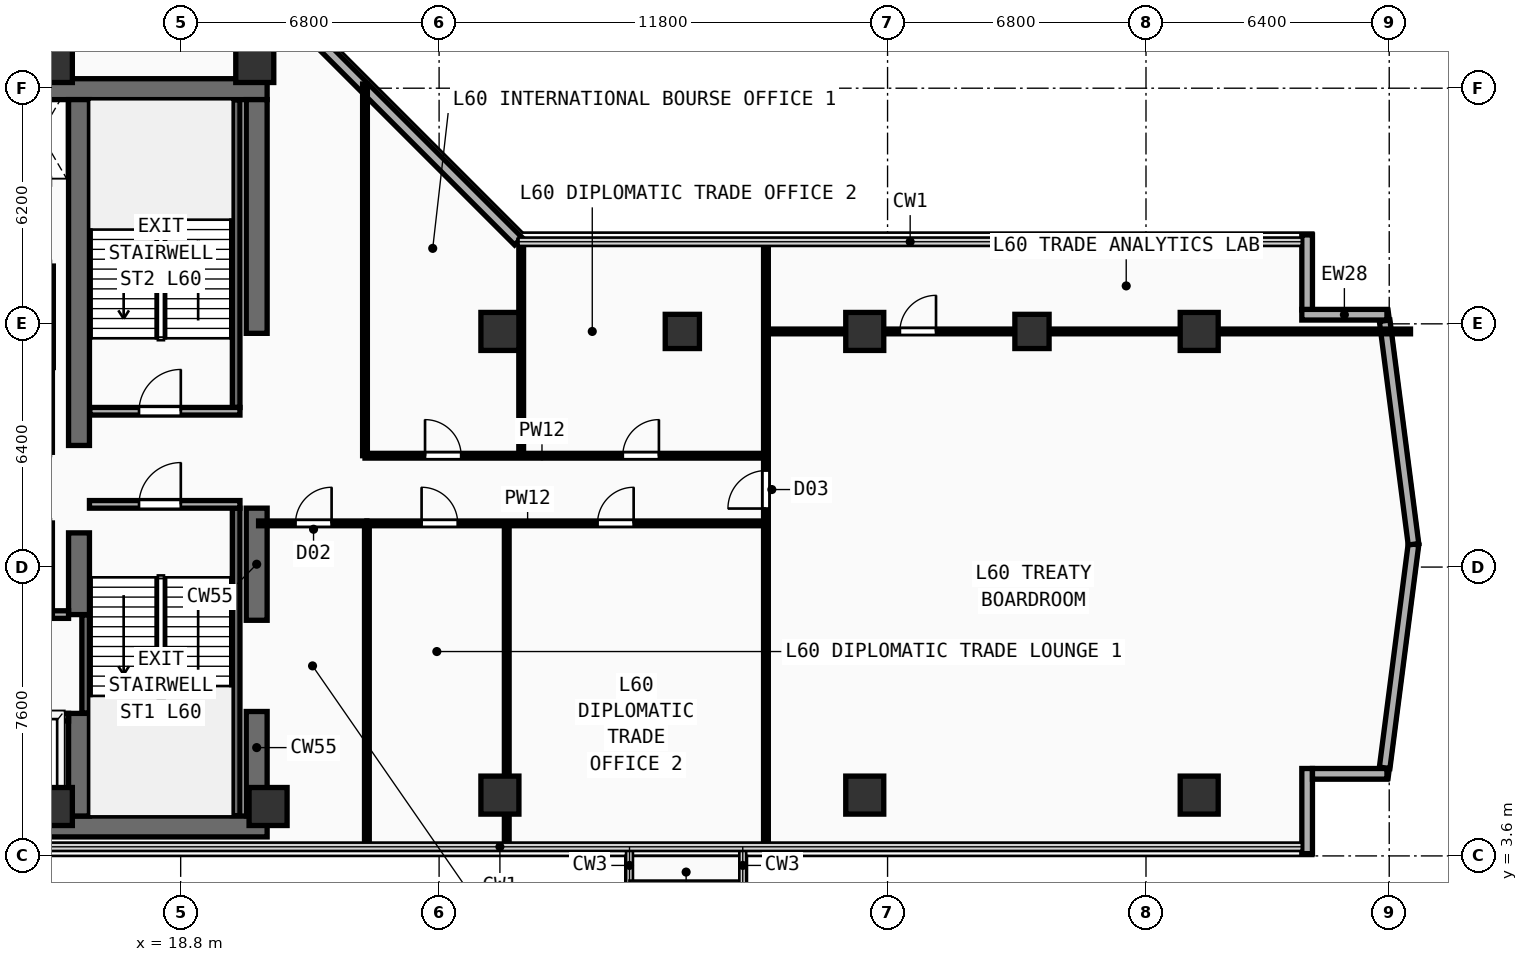
"""IFC4 building model, lengths in metres.
Left out: names, types, materials, properties, quantities, classifications, styles, units other than length and angle.
Written with IfcOpenShell. Run it as: python <this file> out.ifc"""

import sys

from ifc_helpers import new_model, si_unit, direction, frame, frame_2d, origin, origin_2d, place, context, subcontext, project, spatial, rectangle, extrude, element, fill, save


model = new_model("IFC4")
c1 = context("Model", 3, precision=1e-05, world=origin(), true_north=direction((0.0, 1.0)))
c2 = subcontext(c1, "Body", "Model", "MODEL_VIEW")
j1 = project(units=[si_unit("LENGTHUNIT", "METRE"), si_unit("PLANEANGLEUNIT", "RADIAN")], contexts=[c1])
p1 = place(None, origin())
s1 = spatial("IfcSite", under=j1, at=p1, CompositionType="ELEMENT")
p2 = place(p1, origin())
s2 = spatial("IfcBuilding", under=s1, at=p2, CompositionType="ELEMENT")
p3 = place(p2, frame((0.0, 0.0, 234.9)))
s3 = spatial("IfcBuildingStorey", under=s2, at=p3, CompositionType="ELEMENT", Elevation=234.9)
for number, where, z_axis, x_axis in (
    (1, (7.175, 4.375, 0.0), (0.0, 0.0, 1.0), (1.0, 0.0, 0.0)),
    (2, (7.175, 23.775, 0.0), (0.0, 0.0, 1.0), (1.0, 0.0, 0.0)),
):
    element("IfcWall", number, at=place(p3, frame(where, z_axis=z_axis, x_axis=x_axis)), inside=s3, PredefinedType="SHEAR", context=c2, shape_type="SweptSolid", body=[
        extrude(rectangle(XDim=13.9, YDim=0.55, at=frame_2d((6.95, 0.0))), origin(), (0.0, 0.0, 1.0), 3.56),
    ])
p4 = place(p3, frame((20.8, 4.65, 0.0), z_axis=(0.0, 0.0, 1.0), x_axis=(0.0, 1.0, 0.0)))
e3 = element("IfcWall", 3, at=p4, inside=s3, PredefinedType="SHEAR", context=c2, shape_type="SweptSolid", body=[
    extrude(rectangle(XDim=2.75, YDim=0.55, at=frame_2d((1.375, 0.0))), origin(), (0.0, 0.0, 1.0), 3.56),
])
p5 = place(p3, frame((20.8, 9.8, 0.0), z_axis=(0.0, 0.0, 1.0), x_axis=(0.0, 1.0, 0.0)))
e4 = element("IfcWall", 4, at=p5, inside=s3, PredefinedType="SHEAR", context=c2, shape_type="SweptSolid", body=[
    extrude(rectangle(XDim=2.95, YDim=0.55, at=frame_2d((1.475, 0.0))), origin(), (0.0, 0.0, 1.0), 3.56),
])
p6 = place(p3, frame((20.8, 17.35, 0.0), z_axis=(0.0, 0.0, 1.0), x_axis=(0.0, 1.0, 0.0)))
e5 = element("IfcWall", 5, at=p6, inside=s3, PredefinedType="SHEAR", context=c2, shape_type="SweptSolid", body=[
    extrude(rectangle(XDim=6.15, YDim=0.55, at=frame_2d((3.075, 0.0))), origin(), (0.0, 0.0, 1.0), 3.56),
])
p7 = place(p3, frame((16.125, 4.65, 0.0), z_axis=(0.0, 0.0, 1.0), x_axis=(0.0, 1.0, 0.0)))
e6 = element("IfcWall", 6, at=p7, inside=s3, PredefinedType="SHEAR", context=c2, shape_type="SweptSolid", body=[
    extrude(rectangle(XDim=2.7, YDim=0.55, at=frame_2d((1.35, 0.0))), origin(), (0.0, 0.0, 1.0), 3.56),
])
p8 = place(p3, frame((16.125, 9.95, 0.0), z_axis=(0.0, 0.0, 1.0), x_axis=(0.0, 1.0, 0.0)))
e7 = element("IfcWall", 7, at=p8, inside=s3, PredefinedType="SHEAR", context=c2, shape_type="SweptSolid", body=[
    extrude(rectangle(XDim=2.15, YDim=0.55, at=frame_2d((1.075, 0.0))), origin(), (0.0, 0.0, 1.0), 3.56),
])
p9 = place(p3, frame((16.125, 14.4, 0.0), z_axis=(0.0, 0.0, 1.0), x_axis=(0.0, 1.0, 0.0)))
e8 = element("IfcWall", 8, at=p9, inside=s3, PredefinedType="SHEAR", context=c2, shape_type="SweptSolid", body=[
    extrude(rectangle(XDim=9.1, YDim=0.55, at=frame_2d((4.55, 0.0))), origin(), (0.0, 0.0, 1.0), 3.56),
])
for number, where, z_axis, x_axis in (
    (9, (15.45, 4.9, 0.0), (0.0, 0.0, 1.0), (1.0, 0.0, 0.0)),
    (10, (21.1, 4.9, 0.0), (0.0, 0.0, 1.0), (1.0, 0.0, 0.0)),
    (11, (15.45, 24.45, 0.0), (0.0, 0.0, 1.0), (1.0, 0.0, 0.0)),
    (12, (20.75, 24.45, 0.0), (0.0, 0.0, 1.0), (1.0, 0.0, 0.0)),
    (13, (27.2, 5.2, 0.0), (0.0, 0.0, 1.0), (1.0, 0.0, 0.0)),
    (14, (36.8, 5.2, 0.0), (0.0, 0.0, 1.0), (1.0, 0.0, 0.0)),
    (15, (45.6, 5.2, 0.0), (0.0, 0.0, 1.0), (1.0, 0.0, 0.0)),
    (16, (27.2, 17.4, 0.0), (0.0, 0.0, 1.0), (1.0, 0.0, 0.0)),
    (17, (36.8, 17.4, 0.0), (0.0, 0.0, 1.0), (1.0, 0.0, 0.0)),
    (18, (45.6, 17.4, 0.0), (0.0, 0.0, 1.0), (1.0, 0.0, 0.0)),
):
    element("IfcColumn", number, at=place(p3, frame(where, z_axis=z_axis, x_axis=x_axis)), inside=s3, PredefinedType="COLUMN", context=c2, shape_type="SweptSolid", body=[
        extrude(rectangle(XDim=1.0, YDim=1.0, at=origin_2d()), origin(), (0.0, 0.0, 1.0), 3.56),
    ])
for number, where, z_axis, x_axis in (
    (19, (32.0, 17.4, 0.0), (0.0, 0.0, 1.0), (1.0, 0.0, 0.0)),
    (20, (41.2, 17.4, 0.0), (0.0, 0.0, 1.0), (1.0, 0.0, 0.0)),
):
    element("IfcColumn", number, at=place(p3, frame(where, z_axis=z_axis, x_axis=x_axis)), inside=s3, PredefinedType="COLUMN", context=c2, shape_type="SweptSolid", body=[
        extrude(rectangle(XDim=0.9, YDim=0.9, at=origin_2d()), origin(), (0.0, 0.0, 1.0), 3.56),
    ])
p10 = place(p3, frame((48.44, 3.66, 0.0), z_axis=(0.0, 0.0, 1.0), x_axis=(0.0, 1.0, 0.0)))
e21 = element("IfcWall", 21, at=p10, inside=s3, PredefinedType="SOLIDWALL", context=c2, shape_type="SweptSolid", body=[
    extrude(rectangle(XDim=2.24, YDim=0.28, at=frame_2d((1.12, 0.0))), origin(), (0.0, 0.0, 1.0), 3.56),
])
p11 = place(p3, frame((48.58, 5.76, 0.0), z_axis=(0.0, 0.0, 1.0), x_axis=(1.0, 0.0, 0.0)))
e22 = element("IfcWall", 22, at=p11, inside=s3, PredefinedType="SOLIDWALL", context=c2, shape_type="SweptSolid", body=[
    extrude(rectangle(XDim=1.96, YDim=0.28, at=frame_2d((0.98, 0.0))), origin(), (0.0, 0.0, 1.0), 3.56),
])
p12 = place(p3, frame((48.44, 17.965, 0.0), z_axis=(0.0, 0.0, 1.0), x_axis=(0.0, 1.0, 0.0)))
e23 = element("IfcWall", 23, at=p12, inside=s3, PredefinedType="SOLIDWALL", context=c2, shape_type="SweptSolid", body=[
    extrude(rectangle(XDim=1.975, YDim=0.28, at=frame_2d((0.987, 0.0))), origin(), (0.0, 0.0, 1.0), 3.56),
])
p13 = place(p3, frame((48.3, 17.84, 0.0), z_axis=(0.0, 0.0, 1.0), x_axis=(1.0, 0.0, 0.0)))
e24 = element("IfcWall", 24, at=p13, inside=s3, PredefinedType="SOLIDWALL", context=c2, shape_type="SweptSolid", body=[
    extrude(rectangle(XDim=2.24, YDim=0.28, at=frame_2d((1.12, 0.0))), origin(), (0.0, 0.0, 1.0), 3.56),
])
p14 = place(p3, frame((27.685, 19.775, 0.0), z_axis=(0.0, 0.0, 1.0), x_axis=(-0.707106781187, 0.707106781187, 0.0)))
e25 = element("IfcWall", 25, at=p14, inside=s3, PredefinedType="SOLIDWALL", context=c2, shape_type="SweptSolid", body=[
    extrude(rectangle(XDim=9.207, YDim=0.28, at=frame_2d((4.603, 0.0))), origin(), (0.0, 0.0, 1.0), 3.56),
])
for number, where, z_axis, x_axis in (
    (26, (50.48, 5.918, 0.0), (0.0, 0.0, 1.0), (0.128, 0.992, 0.0)),
    (27, (51.239, 11.799, 0.0), (0.0, 0.0, 1.0), (-0.128, 0.992, 0.0)),
):
    element("IfcWall", number, at=place(p3, frame(where, z_axis=z_axis, x_axis=x_axis)), inside=s3, PredefinedType="SOLIDWALL", context=c2, shape_type="SweptSolid", body=[
        extrude(rectangle(XDim=5.931, YDim=0.28, at=frame_2d((2.966, 0.0))), origin(), (0.0, 0.0, 1.0), 3.56),
    ])
p15 = place(p3, frame((16.3, 7.36, 0.0), z_axis=(0.0, 0.0, 1.0), x_axis=(0.0, 1.0, 0.0)))
e28 = element("IfcWall", 28, at=p15, inside=s3, PredefinedType="SHEAR", context=c2, shape_type="SweptSolid", body=[
    extrude(rectangle(XDim=2.58, YDim=0.2, at=frame_2d((1.29, 0.0))), origin(), (0.0, 0.0, 1.0), 3.56),
])
p16 = place(p3, frame((20.26, 4.66, 0.0), z_axis=(0.0, 0.0, 1.0), x_axis=(0.0, 1.0, 0.0)))
e29 = element("IfcWall", 29, at=p16, inside=s3, PredefinedType="SHEAR", context=c2, shape_type="SweptSolid", body=[
    extrude(rectangle(XDim=8.09, YDim=0.2, at=frame_2d((4.045, 0.0))), origin(), (0.0, 0.0, 1.0), 3.56),
])
p17 = place(p3, frame((16.4, 12.85, 0.0), z_axis=(0.0, 0.0, 1.0), x_axis=(1.0, 0.0, 0.0)))
e30 = element("IfcWall", 30, at=p17, inside=s3, PredefinedType="PARTITIONING", context=c2, shape_type="SweptSolid", body=[
    extrude(rectangle(XDim=3.96, YDim=0.2, at=frame_2d((1.98, 0.0))), origin(), (0.0, 0.0, 1.0), 3.56),
])
p18 = place(p17, frame((1.304, 0.0, 0.0)))
e31 = element("IfcOpeningElement", 31, at=p18, cuts=e30, PredefinedType="OPENING", context=c2, shape_type="SweptSolid", body=[
    extrude(rectangle(XDim=1.1, YDim=2.2, at=frame_2d((0.55, 1.1))), frame((0.0, 0.11, 0.0), z_axis=(0.0, -1.0, 0.0), x_axis=(1.0, 0.0, 0.0)), (0.0, 0.0, 1.0), 0.22),
])
p19 = place(p3, frame((20.26, 15.4, 0.0), z_axis=(0.0, 0.0, 1.0), x_axis=(0.0, 1.0, 0.0)))
e32 = element("IfcWall", 32, at=p19, inside=s3, PredefinedType="SHEAR", context=c2, shape_type="SweptSolid", body=[
    extrude(rectangle(XDim=8.09, YDim=0.2, at=frame_2d((4.045, 0.0))), origin(), (0.0, 0.0, 1.0), 3.56),
])
p20 = place(p3, frame((16.41, 15.3, 0.0), z_axis=(0.0, 0.0, 1.0), x_axis=(1.0, 0.0, 0.0)))
e33 = element("IfcWall", 33, at=p20, inside=s3, PredefinedType="PARTITIONING", context=c2, shape_type="SweptSolid", body=[
    extrude(rectangle(XDim=3.95, YDim=0.2, at=frame_2d((1.975, 0.0))), origin(), (0.0, 0.0, 1.0), 3.56),
])
p21 = place(p20, frame((1.294, 0.0, 0.0)))
e34 = element("IfcOpeningElement", 34, at=p21, cuts=e33, PredefinedType="OPENING", context=c2, shape_type="SweptSolid", body=[
    extrude(rectangle(XDim=1.1, YDim=2.2, at=frame_2d((0.55, 1.1))), frame((0.0, 0.11, 0.0), z_axis=(0.0, -1.0, 0.0), x_axis=(1.0, 0.0, 0.0)), (0.0, 0.0, 1.0), 0.22),
])
p22 = place(p3, frame((7.5, 7.25, 0.0), z_axis=(0.0, 0.0, 1.0), x_axis=(1.0, 0.0, 0.0)))
e35 = element("IfcWall", 35, at=p22, inside=s3, PredefinedType="PARTITIONING", context=c2, shape_type="SweptSolid", body=[
    extrude(rectangle(XDim=8.35, YDim=0.2, at=frame_2d((4.175, 0.0))), origin(), (0.0, 0.0, 1.0), 3.56),
])
p23 = place(p22, frame((0.53, 0.0, 0.0)))
e36 = element("IfcOpeningElement", 36, at=p23, cuts=e35, PredefinedType="OPENING", context=c2, shape_type="SweptSolid", body=[
    extrude(rectangle(XDim=1.1, YDim=2.2, at=frame_2d((0.55, 1.1))), frame((0.0, 0.11, 0.0), z_axis=(0.0, -1.0, 0.0), x_axis=(1.0, 0.0, 0.0)), (0.0, 0.0, 1.0), 0.22),
])
p24 = place(p22, frame((2.37, 0.0, 0.0)))
e37 = element("IfcOpeningElement", 37, at=p24, cuts=e35, PredefinedType="OPENING", context=c2, shape_type="SweptSolid", body=[
    extrude(rectangle(XDim=1.1, YDim=2.2, at=frame_2d((0.55, 1.1))), frame((0.0, 0.11, 0.0), z_axis=(0.0, -1.0, 0.0), x_axis=(1.0, 0.0, 0.0)), (0.0, 0.0, 1.0), 0.22),
])
p25 = place(p22, frame((4.33, 0.0, 0.0)))
e38 = element("IfcOpeningElement", 38, at=p25, cuts=e35, PredefinedType="OPENING", context=c2, shape_type="SweptSolid", body=[
    extrude(rectangle(XDim=1.1, YDim=2.2, at=frame_2d((0.55, 1.1))), frame((0.0, 0.11, 0.0), z_axis=(0.0, -1.0, 0.0), x_axis=(1.0, 0.0, 0.0)), (0.0, 0.0, 1.0), 0.22),
])
p26 = place(p22, frame((6.5, 0.0, 0.0)))
e39 = element("IfcOpeningElement", 39, at=p26, cuts=e35, PredefinedType="OPENING", context=c2, shape_type="SweptSolid", body=[
    extrude(rectangle(XDim=1.1, YDim=2.2, at=frame_2d((0.55, 1.1))), frame((0.0, 0.11, 0.0), z_axis=(0.0, -1.0, 0.0), x_axis=(1.0, 0.0, 0.0)), (0.0, 0.0, 1.0), 0.22),
])
p27 = place(p3, frame((7.5, 9.95, 0.0), z_axis=(0.0, 0.0, 1.0), x_axis=(1.0, 0.0, 0.0)))
e40 = element("IfcWall", 40, at=p27, inside=s3, PredefinedType="PARTITIONING", context=c2, shape_type="SweptSolid", body=[
    extrude(rectangle(XDim=8.35, YDim=0.2, at=frame_2d((4.175, 0.0))), origin(), (0.0, 0.0, 1.0), 3.56),
])
p28 = place(p3, frame((15.35, 9.95, 0.0), z_axis=(0.0, 0.0, 1.0), x_axis=(0.0, 1.0, 0.0)))
e41 = element("IfcWall", 41, at=p28, inside=s3, PredefinedType="PARTITIONING", context=c2, shape_type="SweptSolid", body=[
    extrude(rectangle(XDim=2.41, YDim=0.15, at=frame_2d((1.205, 0.0))), origin(), (0.0, 0.0, 1.0), 3.56),
])
p29 = place(p3, frame((15.35, 14.22, 0.0), z_axis=(0.0, 0.0, 1.0), x_axis=(0.0, 1.0, 0.0)))
e42 = element("IfcWall", 42, at=p29, inside=s3, PredefinedType="PARTITIONING", context=c2, shape_type="SweptSolid", body=[
    extrude(rectangle(XDim=2.23, YDim=0.15, at=frame_2d((1.115, 0.0))), origin(), (0.0, 0.0, 1.0), 3.56),
])
p30 = place(p3, frame((15.35, 16.45, 0.0), z_axis=(0.0, 0.0, 1.0), x_axis=(0.0, 1.0, 0.0)))
e43 = element("IfcWall", 43, at=p30, inside=s3, PredefinedType="PARTITIONING", context=c2, shape_type="SweptSolid", body=[
    extrude(rectangle(XDim=2.67, YDim=0.2, at=frame_2d((1.335, 0.0))), origin(), (0.0, 0.0, 1.0), 3.56),
])
p31 = place(p3, frame((20.85, 12.35, 0.0), z_axis=(0.0, 0.0, 1.0), x_axis=(1.0, 0.0, 0.0)))
e44 = element("IfcWall", 44, at=p31, inside=s3, PredefinedType="PARTITIONING", context=c2, shape_type="SweptSolid", body=[
    extrude(rectangle(XDim=2.85, YDim=0.125, at=frame_2d((1.425, 0.0))), origin(), (0.0, 0.0, 1.0), 3.56),
])
p32 = place(p31, frame((0.971, 0.0, 0.0)))
e45 = element("IfcOpeningElement", 45, at=p32, cuts=e44, PredefinedType="OPENING", context=c2, shape_type="SweptSolid", body=[
    extrude(rectangle(XDim=0.95, YDim=2.15, at=frame_2d((0.475, 1.075))), frame((0.0, 0.073, 0.0), z_axis=(0.0, -1.0, 0.0), x_axis=(1.0, 0.0, 0.0)), (0.0, 0.0, 1.0), 0.145),
])
p33 = place(p3, frame((23.7, 3.84, 0.0), z_axis=(0.0, 0.0, 1.0), x_axis=(0.0, 1.0, 0.0)))
e46 = element("IfcWall", 46, at=p33, inside=s3, PredefinedType="PARTITIONING", context=c2, shape_type="SweptSolid", body=[
    extrude(rectangle(XDim=8.51, YDim=0.125, at=frame_2d((4.255, 0.0))), origin(), (0.0, 0.0, 1.0), 3.56),
])
p34 = place(p3, frame((23.7, 12.35, 0.0), z_axis=(0.0, 0.0, 1.0), x_axis=(1.0, 0.0, 0.0)))
e47 = element("IfcWall", 47, at=p34, inside=s3, PredefinedType="PARTITIONING", context=c2, shape_type="SweptSolid", body=[
    extrude(rectangle(XDim=10.5, YDim=0.125, at=frame_2d((5.25, 0.0))), origin(), (0.0, 0.0, 1.0), 3.56),
])
p35 = place(p34, frame((1.439, 0.0, 0.0)))
e48 = element("IfcOpeningElement", 48, at=p35, cuts=e47, PredefinedType="OPENING", context=c2, shape_type="SweptSolid", body=[
    extrude(rectangle(XDim=0.95, YDim=2.15, at=frame_2d((0.475, 1.075))), frame((0.0, 0.073, 0.0), z_axis=(0.0, -1.0, 0.0), x_axis=(1.0, 0.0, 0.0)), (0.0, 0.0, 1.0), 0.145),
])
p36 = place(p34, frame((6.069, 0.0, 0.0)))
e49 = element("IfcOpeningElement", 49, at=p36, cuts=e47, PredefinedType="OPENING", context=c2, shape_type="SweptSolid", body=[
    extrude(rectangle(XDim=0.95, YDim=2.15, at=frame_2d((0.475, 1.075))), frame((0.0, 0.073, 0.0), z_axis=(0.0, -1.0, 0.0), x_axis=(1.0, 0.0, 0.0)), (0.0, 0.0, 1.0), 0.145),
])
p37 = place(p3, frame((27.38, 3.84, 0.0), z_axis=(0.0, 0.0, 1.0), x_axis=(0.0, 1.0, 0.0)))
e50 = element("IfcWall", 50, at=p37, inside=s3, PredefinedType="PARTITIONING", context=c2, shape_type="SweptSolid", body=[
    extrude(rectangle(XDim=8.51, YDim=0.125, at=frame_2d((4.255, 0.0))), origin(), (0.0, 0.0, 1.0), 3.16),
])
p38 = place(p3, frame((34.2, 3.84, 0.0), z_axis=(0.0, 0.0, 1.0), x_axis=(0.0, 1.0, 0.0)))
e51 = element("IfcWall", 51, at=p38, inside=s3, PredefinedType="PARTITIONING", context=c2, shape_type="SweptSolid", body=[
    extrude(rectangle(XDim=15.92, YDim=0.125, at=frame_2d((7.96, 0.0))), origin(), (0.0, 0.0, 1.0), 3.56),
])
p39 = place(p38, frame((8.9, 0.0, 0.0)))
e52 = element("IfcOpeningElement", 52, at=p39, cuts=e51, PredefinedType="OPENING", context=c2, shape_type="SweptSolid", body=[
    extrude(rectangle(XDim=1.0, YDim=2.2, at=frame_2d((0.5, 1.1))), frame((0.0, 0.073, 0.0), z_axis=(0.0, -1.0, 0.0), x_axis=(1.0, 0.0, 0.0)), (0.0, 0.0, 1.0), 0.145),
])
p40 = place(p3, frame((34.2, 17.4, 0.0), z_axis=(0.0, 0.0, 1.0), x_axis=(1.0, 0.0, 0.0)))
e53 = element("IfcWall", 53, at=p40, inside=s3, PredefinedType="PARTITIONING", context=c2, shape_type="SweptSolid", body=[
    extrude(rectangle(XDim=16.96, YDim=0.125, at=frame_2d((8.48, 0.0))), origin(), (0.0, 0.0, 1.0), 3.26),
])
p41 = place(p40, frame((3.525, 0.0, 0.0)))
e54 = element("IfcOpeningElement", 54, at=p41, cuts=e53, PredefinedType="OPENING", context=c2, shape_type="SweptSolid", body=[
    extrude(rectangle(XDim=0.95, YDim=2.15, at=frame_2d((0.475, 1.075))), frame((0.0, 0.073, 0.0), z_axis=(0.0, -1.0, 0.0), x_axis=(1.0, 0.0, 0.0)), (0.0, 0.0, 1.0), 0.145),
])
p42 = place(p3, frame((23.65, 14.13, 0.0), z_axis=(0.0, 0.0, 1.0), x_axis=(0.0, 1.0, 0.0)))
e55 = element("IfcWall", 55, at=p42, inside=s3, PredefinedType="PARTITIONING", context=c2, shape_type="SweptSolid", body=[
    extrude(rectangle(XDim=9.78, YDim=0.125, at=frame_2d((4.89, 0.0))), origin(), (0.0, 0.0, 1.0), 3.56),
])
p43 = place(p3, frame((23.65, 14.13, 0.0), z_axis=(0.0, 0.0, 1.0), x_axis=(1.0, 0.0, 0.0)))
e56 = element("IfcWall", 56, at=p43, inside=s3, PredefinedType="PARTITIONING", context=c2, shape_type="SweptSolid", body=[
    extrude(rectangle(XDim=10.55, YDim=0.125, at=frame_2d((5.275, 0.0))), origin(), (0.0, 0.0, 1.0), 3.56),
])
p44 = place(p43, frame((1.58, 0.0, 0.0)))
e57 = element("IfcOpeningElement", 57, at=p44, cuts=e56, PredefinedType="OPENING", context=c2, shape_type="SweptSolid", body=[
    extrude(rectangle(XDim=0.95, YDim=2.15, at=frame_2d((0.475, 1.075))), frame((0.0, 0.073, 0.0), z_axis=(0.0, -1.0, 0.0), x_axis=(1.0, 0.0, 0.0)), (0.0, 0.0, 1.0), 0.145),
])
p45 = place(p43, frame((6.784, 0.0, 0.0)))
e58 = element("IfcOpeningElement", 58, at=p45, cuts=e56, PredefinedType="OPENING", context=c2, shape_type="SweptSolid", body=[
    extrude(rectangle(XDim=0.95, YDim=2.15, at=frame_2d((0.475, 1.075))), frame((0.0, 0.073, 0.0), z_axis=(0.0, -1.0, 0.0), x_axis=(1.0, 0.0, 0.0)), (0.0, 0.0, 1.0), 0.145),
])
p46 = place(p3, frame((27.76, 14.13, 0.0), z_axis=(0.0, 0.0, 1.0), x_axis=(0.0, 1.0, 0.0)))
e59 = element("IfcWall", 59, at=p46, inside=s3, PredefinedType="PARTITIONING", context=c2, shape_type="SweptSolid", body=[
    extrude(rectangle(XDim=5.67, YDim=0.125, at=frame_2d((2.835, 0.0))), origin(), (0.0, 0.0, 1.0), 3.56),
])
p47 = place(p18, frame((1.1, 0.0, 0.0), z_axis=(0.0, 0.0, 1.0), x_axis=(-1.0, 0.0, 0.0)))
e60 = element("IfcDoor", 60, at=p47, inside=s3, OperationType="SINGLE_SWING_LEFT", PredefinedType="DOOR", context=c2, shape_type="SweptSolid", body=[
    extrude(rectangle(XDim=1.1, YDim=2.2, at=frame_2d((0.55, 1.1))), frame((0.0, 0.025, 0.0), z_axis=(0.0, -1.0, 0.0), x_axis=(1.0, 0.0, 0.0)), (0.0, 0.0, 1.0), 0.05),
])
fill(e31, e60)
p48 = place(p21, origin())
e61 = element("IfcDoor", 61, at=p48, inside=s3, OperationType="SINGLE_SWING_RIGHT", PredefinedType="DOOR", context=c2, shape_type="SweptSolid", body=[
    extrude(rectangle(XDim=1.1, YDim=2.2, at=frame_2d((0.55, 1.1))), frame((0.0, 0.025, 0.0), z_axis=(0.0, -1.0, 0.0), x_axis=(1.0, 0.0, 0.0)), (0.0, 0.0, 1.0), 0.05),
])
fill(e34, e61)
p49 = place(p32, origin())
e62 = element("IfcDoor", 62, at=p49, inside=s3, OperationType="SINGLE_SWING_RIGHT", PredefinedType="DOOR", context=c2, shape_type="SweptSolid", body=[
    extrude(rectangle(XDim=0.95, YDim=2.15, at=frame_2d((0.475, 1.075))), frame((0.0, 0.025, 0.0), z_axis=(0.0, -1.0, 0.0), x_axis=(1.0, 0.0, 0.0)), (0.0, 0.0, 1.0), 0.05),
])
fill(e45, e62)
p50 = place(p35, origin())
e63 = element("IfcDoor", 63, at=p50, inside=s3, OperationType="SINGLE_SWING_LEFT", PredefinedType="DOOR", context=c2, shape_type="SweptSolid", body=[
    extrude(rectangle(XDim=0.95, YDim=2.15, at=frame_2d((0.475, 1.075))), frame((0.0, 0.025, 0.0), z_axis=(0.0, -1.0, 0.0), x_axis=(1.0, 0.0, 0.0)), (0.0, 0.0, 1.0), 0.05),
])
fill(e48, e63)
p51 = place(p36, origin())
e64 = element("IfcDoor", 64, at=p51, inside=s3, OperationType="SINGLE_SWING_RIGHT", PredefinedType="DOOR", context=c2, shape_type="SweptSolid", body=[
    extrude(rectangle(XDim=0.95, YDim=2.15, at=frame_2d((0.475, 1.075))), frame((0.0, 0.025, 0.0), z_axis=(0.0, -1.0, 0.0), x_axis=(1.0, 0.0, 0.0)), (0.0, 0.0, 1.0), 0.05),
])
fill(e49, e64)
p52 = place(p39, origin())
e65 = element("IfcDoor", 65, at=p52, inside=s3, OperationType="SINGLE_SWING_LEFT", PredefinedType="DOOR", context=c2, shape_type="SweptSolid", body=[
    extrude(rectangle(XDim=1.0, YDim=2.2, at=frame_2d((0.5, 1.1))), frame((0.0, 0.025, 0.0), z_axis=(0.0, -1.0, 0.0), x_axis=(1.0, 0.0, 0.0)), (0.0, 0.0, 1.0), 0.05),
])
fill(e52, e65)
p53 = place(p41, origin())
e66 = element("IfcDoor", 66, at=p53, inside=s3, OperationType="SINGLE_SWING_RIGHT", PredefinedType="DOOR", context=c2, shape_type="SweptSolid", body=[
    extrude(rectangle(XDim=0.95, YDim=2.15, at=frame_2d((0.475, 1.075))), frame((0.0, 0.025, 0.0), z_axis=(0.0, -1.0, 0.0), x_axis=(1.0, 0.0, 0.0)), (0.0, 0.0, 1.0), 0.05),
])
fill(e54, e66)
p54 = place(p44, origin())
e67 = element("IfcDoor", 67, at=p54, inside=s3, OperationType="SINGLE_SWING_LEFT", PredefinedType="DOOR", context=c2, shape_type="SweptSolid", body=[
    extrude(rectangle(XDim=0.95, YDim=2.15, at=frame_2d((0.475, 1.075))), frame((0.0, 0.025, 0.0), z_axis=(0.0, -1.0, 0.0), x_axis=(1.0, 0.0, 0.0)), (0.0, 0.0, 1.0), 0.05),
])
fill(e57, e67)
p55 = place(p45, origin())
e68 = element("IfcDoor", 68, at=p55, inside=s3, OperationType="SINGLE_SWING_RIGHT", PredefinedType="DOOR", context=c2, shape_type="SweptSolid", body=[
    extrude(rectangle(XDim=0.95, YDim=2.15, at=frame_2d((0.475, 1.075))), frame((0.0, 0.025, 0.0), z_axis=(0.0, -1.0, 0.0), x_axis=(1.0, 0.0, 0.0)), (0.0, 0.0, 1.0), 0.05),
])
fill(e58, e68)
save(model, sys.argv[1])
